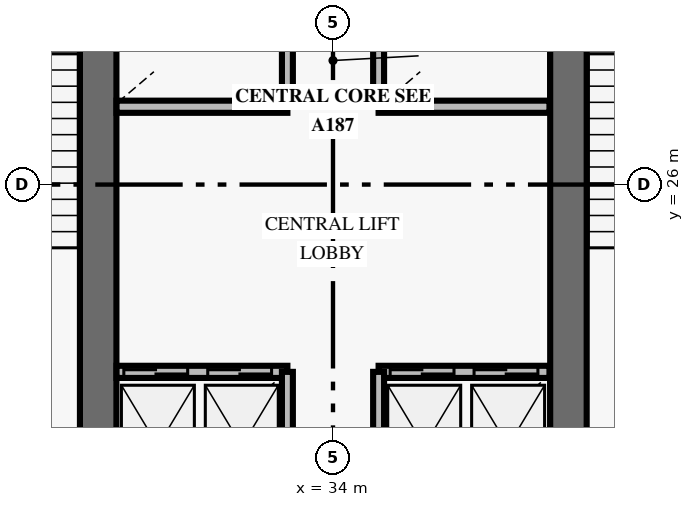
"""IFC4 building model, lengths in metres.
Left out: names, types, materials, properties, quantities, classifications, styles, units other than length and angle.
Written with IfcOpenShell. Run it as: python <this file> out.ifc"""

import sys

from ifc_helpers import new_model, si_unit, direction, frame, frame_2d, origin, place, context, subcontext, project, spatial, rectangle, extrude, element, fill, save


model = new_model("IFC4")
c1 = context("Model", 3, precision=1e-05, world=origin(), true_north=direction((0.0, 1.0)))
c2 = subcontext(c1, "Body", "Model", "MODEL_VIEW")
j1 = project(units=[si_unit("LENGTHUNIT", "METRE"), si_unit("PLANEANGLEUNIT", "RADIAN")], contexts=[c1])
p1 = place(None, origin())
s1 = spatial("IfcSite", under=j1, at=p1, CompositionType="ELEMENT")
p2 = place(p1, origin())
s2 = spatial("IfcBuilding", under=s1, at=p2, CompositionType="ELEMENT")
p3 = place(p2, frame((0.0, 0.0, 30.0)))
s3 = spatial("IfcBuildingStorey", under=s2, at=p3, CompositionType="ELEMENT", Elevation=30.0)
for number, where, z_axis, x_axis in (
    (1, (30.138, 20.112, 0.0), (0.0, 0.0, 1.0), (0.0, 1.0, 0.0)),
    (2, (37.872, 20.112, 0.0), (0.0, 0.0, 1.0), (0.0, 1.0, 0.0)),
):
    element("IfcWall", number, at=place(p3, frame(where, z_axis=z_axis, x_axis=x_axis)), inside=s3, PredefinedType="SHEAR", context=c2, shape_type="SweptSolid", body=[
        extrude(rectangle(XDim=9.976, YDim=0.6, at=frame_2d((4.988, 0.0))), origin(), (0.0, 0.0, 1.0), 4.2),
    ])
p4 = place(p3, frame((30.44, 22.92, 0.0), z_axis=(0.0, 0.0, 1.0), x_axis=(1.0, 0.0, 0.0)))
e3 = element("IfcWall", 3, at=p4, inside=s3, PredefinedType="SOLIDWALL", context=c2, shape_type="SweptSolid", body=[
    extrude(rectangle(XDim=2.81, YDim=0.2, at=frame_2d((1.405, 0.0))), origin(), (0.0, 0.0, 1.0), 2.67),
])
p5 = place(p4, frame((0.12, 0.0, 0.0)))
e4 = element("IfcOpeningElement", 4, at=p5, cuts=e3, PredefinedType="OPENING", context=c2, shape_type="SweptSolid", body=[
    extrude(rectangle(XDim=1.05, YDim=2.1, at=frame_2d((0.525, 1.05))), frame((0.0, 0.11, 0.0), z_axis=(0.0, -1.0, 0.0), x_axis=(1.0, 0.0, 0.0)), (0.0, 0.0, 1.0), 0.22),
])
p6 = place(p4, frame((1.5, 0.0, 0.0)))
e5 = element("IfcOpeningElement", 5, at=p6, cuts=e3, PredefinedType="OPENING", context=c2, shape_type="SweptSolid", body=[
    extrude(rectangle(XDim=1.05, YDim=2.1, at=frame_2d((0.525, 1.05))), frame((0.0, 0.11, 0.0), z_axis=(0.0, -1.0, 0.0), x_axis=(1.0, 0.0, 0.0)), (0.0, 0.0, 1.0), 0.22),
])
p7 = place(p3, frame((33.25, 20.5, 0.0), z_axis=(0.0, 0.0, 1.0), x_axis=(0.0, 1.0, 0.0)))
e6 = element("IfcWall", 6, at=p7, inside=s3, PredefinedType="SOLIDWALL", context=c2, shape_type="SweptSolid", body=[
    extrude(rectangle(XDim=2.42, YDim=0.18, at=frame_2d((1.21, 0.0))), origin(), (0.0, 0.0, 1.0), 2.67),
])
p8 = place(p3, frame((34.75, 22.92, 0.0), z_axis=(0.0, 0.0, 1.0), x_axis=(1.0, 0.0, 0.0)))
e7 = element("IfcWall", 7, at=p8, inside=s3, PredefinedType="SOLIDWALL", context=c2, shape_type="SweptSolid", body=[
    extrude(rectangle(XDim=2.81, YDim=0.2, at=frame_2d((1.405, 0.0))), origin(), (0.0, 0.0, 1.0), 2.67),
])
p9 = place(p8, frame((0.19, 0.0, 0.0)))
e8 = element("IfcOpeningElement", 8, at=p9, cuts=e7, PredefinedType="OPENING", context=c2, shape_type="SweptSolid", body=[
    extrude(rectangle(XDim=1.05, YDim=2.1, at=frame_2d((0.525, 1.05))), frame((0.0, 0.11, 0.0), z_axis=(0.0, -1.0, 0.0), x_axis=(1.0, 0.0, 0.0)), (0.0, 0.0, 1.0), 0.22),
])
p10 = place(p8, frame((1.57, 0.0, 0.0)))
e9 = element("IfcOpeningElement", 9, at=p10, cuts=e7, PredefinedType="OPENING", context=c2, shape_type="SweptSolid", body=[
    extrude(rectangle(XDim=1.05, YDim=2.1, at=frame_2d((0.525, 1.05))), frame((0.0, 0.11, 0.0), z_axis=(0.0, -1.0, 0.0), x_axis=(1.0, 0.0, 0.0)), (0.0, 0.0, 1.0), 0.22),
])
p11 = place(p3, frame((34.75, 20.5, 0.0), z_axis=(0.0, 0.0, 1.0), x_axis=(0.0, 1.0, 0.0)))
e10 = element("IfcWall", 10, at=p11, inside=s3, PredefinedType="SOLIDWALL", context=c2, shape_type="SweptSolid", body=[
    extrude(rectangle(XDim=2.42, YDim=0.18, at=frame_2d((1.21, 0.0))), origin(), (0.0, 0.0, 1.0), 2.67),
])
p12 = place(p3, frame((30.44, 27.28, 0.0), z_axis=(0.0, 0.0, 1.0), x_axis=(1.0, 0.0, 0.0)))
e11 = element("IfcWall", 11, at=p12, inside=s3, PredefinedType="SOLIDWALL", context=c2, shape_type="SweptSolid", body=[
    extrude(rectangle(XDim=2.81, YDim=0.2, at=frame_2d((1.405, 0.0))), origin(), (0.0, 0.0, 1.0), 2.67),
])
p13 = place(p3, frame((33.25, 27.28, 0.0), z_axis=(0.0, 0.0, 1.0), x_axis=(0.0, 1.0, 0.0)))
e12 = element("IfcWall", 12, at=p13, inside=s3, PredefinedType="SOLIDWALL", context=c2, shape_type="SweptSolid", body=[
    extrude(rectangle(XDim=2.47, YDim=0.18, at=frame_2d((1.235, 0.0))), origin(), (0.0, 0.0, 1.0), 2.67),
])
p14 = place(p3, frame((34.75, 27.28, 0.0), z_axis=(0.0, 0.0, 1.0), x_axis=(1.0, 0.0, 0.0)))
e13 = element("IfcWall", 13, at=p14, inside=s3, PredefinedType="SOLIDWALL", context=c2, shape_type="SweptSolid", body=[
    extrude(rectangle(XDim=2.81, YDim=0.2, at=frame_2d((1.405, 0.0))), origin(), (0.0, 0.0, 1.0), 2.67),
])
p15 = place(p3, frame((34.75, 27.28, 0.0), z_axis=(0.0, 0.0, 1.0), x_axis=(0.0, 1.0, 0.0)))
e14 = element("IfcWall", 14, at=p15, inside=s3, PredefinedType="SOLIDWALL", context=c2, shape_type="SweptSolid", body=[
    extrude(rectangle(XDim=2.47, YDim=0.18, at=frame_2d((1.235, 0.0))), origin(), (0.0, 0.0, 1.0), 2.67),
])
p16 = place(p5, origin())
e15 = element("IfcDoor", 15, at=p16, inside=s3, OperationType="DOUBLE_DOOR_SLIDING", PredefinedType="USERDEFINED", context=c2, shape_type="SweptSolid", body=[
    extrude(rectangle(XDim=1.05, YDim=2.1, at=frame_2d((0.525, 1.05))), frame((0.0, 0.025, 0.0), z_axis=(0.0, -1.0, 0.0), x_axis=(1.0, 0.0, 0.0)), (0.0, 0.0, 1.0), 0.05),
])
fill(e4, e15)
p17 = place(p6, origin())
e16 = element("IfcDoor", 16, at=p17, inside=s3, OperationType="DOUBLE_DOOR_SLIDING", PredefinedType="USERDEFINED", context=c2, shape_type="SweptSolid", body=[
    extrude(rectangle(XDim=1.05, YDim=2.1, at=frame_2d((0.525, 1.05))), frame((0.0, 0.025, 0.0), z_axis=(0.0, -1.0, 0.0), x_axis=(1.0, 0.0, 0.0)), (0.0, 0.0, 1.0), 0.05),
])
fill(e5, e16)
p18 = place(p9, origin())
e17 = element("IfcDoor", 17, at=p18, inside=s3, OperationType="DOUBLE_DOOR_SLIDING", PredefinedType="USERDEFINED", context=c2, shape_type="SweptSolid", body=[
    extrude(rectangle(XDim=1.05, YDim=2.1, at=frame_2d((0.525, 1.05))), frame((0.0, 0.025, 0.0), z_axis=(0.0, -1.0, 0.0), x_axis=(1.0, 0.0, 0.0)), (0.0, 0.0, 1.0), 0.05),
])
fill(e8, e17)
p19 = place(p10, origin())
e18 = element("IfcDoor", 18, at=p19, inside=s3, OperationType="DOUBLE_DOOR_SLIDING", PredefinedType="USERDEFINED", context=c2, shape_type="SweptSolid", body=[
    extrude(rectangle(XDim=1.05, YDim=2.1, at=frame_2d((0.525, 1.05))), frame((0.0, 0.025, 0.0), z_axis=(0.0, -1.0, 0.0), x_axis=(1.0, 0.0, 0.0)), (0.0, 0.0, 1.0), 0.05),
])
fill(e9, e18)
save(model, sys.argv[1])
